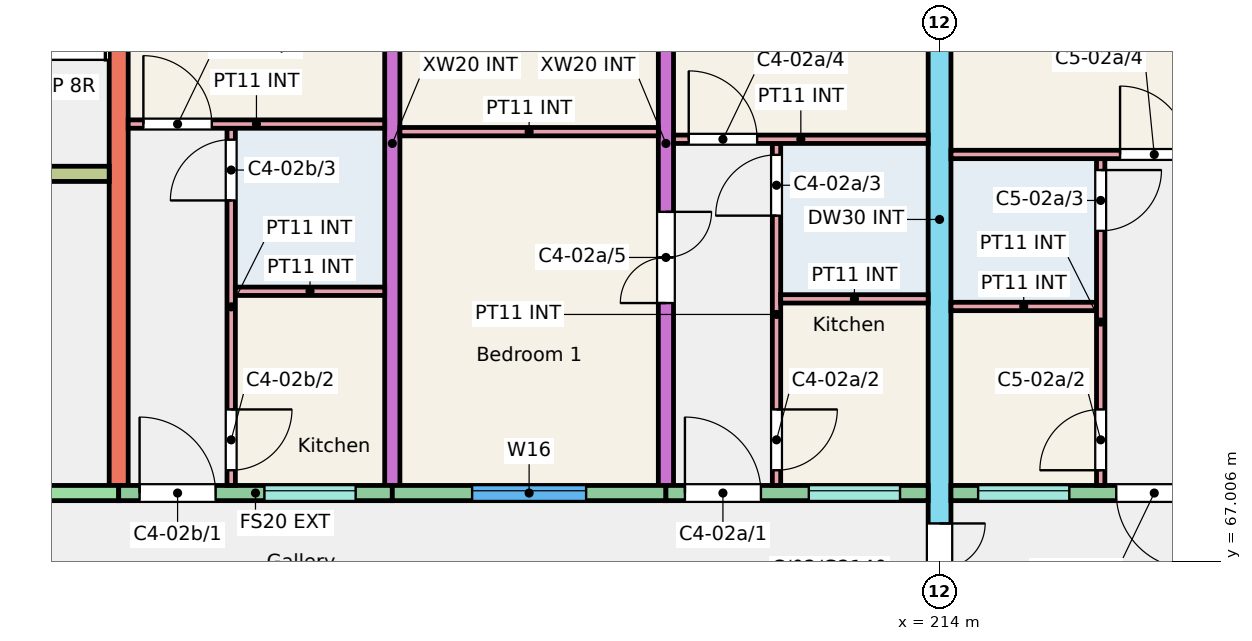
"""IFC4 building model, lengths in metres.
Left out: names, types, materials, properties, quantities, classifications, styles, units other than length and angle.
Written with IfcOpenShell. Run it as: python <this file> out.ifc"""

import sys

from ifc_helpers import new_model, si_unit, direction, frame, frame_2d, origin, place, context, subcontext, project, spatial, rectangle, extrude, element, fill, save


model = new_model("IFC4")
c1 = context("Model", 3, precision=1e-05, world=origin(), true_north=direction((0.0, 1.0)))
c2 = subcontext(c1, "Body", "Model", "MODEL_VIEW")
j1 = project(units=[si_unit("LENGTHUNIT", "METRE"), si_unit("PLANEANGLEUNIT", "RADIAN")], contexts=[c1])
p1 = place(None, origin())
s1 = spatial("IfcSite", under=j1, at=p1, CompositionType="ELEMENT")
p2 = place(p1, origin())
s2 = spatial("IfcBuilding", under=s1, at=p2, CompositionType="ELEMENT")
p3 = place(p2, frame((0.0, 0.0, 6.0)))
s3 = spatial("IfcBuildingStorey", under=s2, at=p3, CompositionType="ELEMENT", Elevation=6.0)
p4 = place(p3, frame((203.2, 68.0, 0.0), z_axis=(0.0, 0.0, 1.0), x_axis=(0.0, 1.0, 0.0)))
e1 = element("IfcWall", 1, at=p4, inside=s3, PredefinedType="SHEAR", context=c2, shape_type="SweptSolid", body=[
    extrude(rectangle(XDim=9.0, YDim=0.25, at=frame_2d((4.5, 0.0))), origin(), (0.0, 0.0, 1.0), 3.0),
])
p5 = place(p3, frame((206.8, 68.0, 0.0), z_axis=(0.0, 0.0, 1.0), x_axis=(0.0, 1.0, 0.0)))
e2 = element("IfcWall", 2, at=p5, inside=s3, PredefinedType="SHEAR", context=c2, shape_type="SweptSolid", body=[
    extrude(rectangle(XDim=9.0, YDim=0.2, at=frame_2d((4.5, 0.0))), origin(), (0.0, 0.0, 1.0), 3.0),
])
p6 = place(p3, frame((210.4, 68.0, 0.0), z_axis=(0.0, 0.0, 1.0), x_axis=(0.0, 1.0, 0.0)))
e3 = element("IfcWall", 3, at=p6, inside=s3, PredefinedType="SHEAR", context=c2, shape_type="SweptSolid", body=[
    extrude(rectangle(XDim=9.0, YDim=0.2, at=frame_2d((4.5, 0.0))), origin(), (0.0, 0.0, 1.0), 3.0),
])
p7 = place(p6, frame((2.4, 0.0, 0.0)))
e4 = element("IfcOpeningElement", 4, at=p7, cuts=e3, PredefinedType="OPENING", context=c2, shape_type="SweptSolid", body=[
    extrude(rectangle(XDim=1.2, YDim=2.1, at=frame_2d((0.6, 1.05))), frame((0.0, 0.11, 0.0), z_axis=(0.0, -1.0, 0.0), x_axis=(1.0, 0.0, 0.0)), (0.0, 0.0, 1.0), 0.22),
])
p8 = place(p6, frame((6.4, 0.0, 0.0)))
e5 = element("IfcOpeningElement", 5, at=p8, cuts=e3, PredefinedType="OPENING", context=c2, shape_type="SweptSolid", body=[
    extrude(rectangle(XDim=1.2, YDim=2.1, at=frame_2d((0.6, 1.05))), frame((0.0, 0.11, 0.0), z_axis=(0.0, -1.0, 0.0), x_axis=(1.0, 0.0, 0.0)), (0.0, 0.0, 1.0), 0.22),
])
p9 = place(p3, frame((214.0, 66.0, 0.0), z_axis=(0.0, 0.0, 1.0), x_axis=(0.0, 1.0, 0.0)))
e6 = element("IfcWall", 6, at=p9, inside=s3, PredefinedType="SHEAR", context=c2, shape_type="SweptSolid", body=[
    extrude(rectangle(XDim=11.0, YDim=0.3, at=frame_2d((5.5, 0.0))), origin(), (0.0, 0.0, 1.0), 3.0),
])
p10 = place(p9, frame((0.3, 0.0, 0.0)))
e7 = element("IfcOpeningElement", 7, at=p10, cuts=e6, PredefinedType="OPENING", context=c2, shape_type="SweptSolid", body=[
    extrude(rectangle(XDim=1.2, YDim=2.1, at=frame_2d((0.6, 1.05))), frame((0.0, 0.16, 0.0), z_axis=(0.0, -1.0, 0.0), x_axis=(1.0, 0.0, 0.0)), (0.0, 0.0, 1.0), 0.32),
])
p11 = place(p3, frame((197.35, 67.9, 0.0), z_axis=(0.0, 0.0, 1.0), x_axis=(1.0, 0.0, 0.0)))
e8 = element("IfcWall", 8, at=p11, inside=s3, PredefinedType="SHEAR", context=c2, shape_type="SweptSolid", body=[
    extrude(rectangle(XDim=5.85, YDim=0.2, at=frame_2d((2.925, 0.0))), origin(), (0.0, 0.0, 1.0), 3.0),
])
p12 = place(p11, frame((2.312, 0.0, 0.0)))
e9 = element("IfcOpeningElement", 9, at=p12, cuts=e8, PredefinedType="OPENING", context=c2, shape_type="SweptSolid", body=[
    extrude(rectangle(XDim=1.1, YDim=2.1, at=frame_2d((0.55, 1.05))), frame((0.0, 0.11, 0.0), z_axis=(0.0, -1.0, 0.0), x_axis=(1.0, 0.0, 0.0)), (0.0, 0.0, 1.0), 0.22),
])
p13 = place(p3, frame((197.35, 72.1, 0.0), z_axis=(0.0, 0.0, 1.0), x_axis=(1.0, 0.0, 0.0)))
e10 = element("IfcWall", 10, at=p13, inside=s3, PredefinedType="SHEAR", context=c2, shape_type="SweptSolid", body=[
    extrude(rectangle(XDim=5.725, YDim=0.2, at=frame_2d((2.862, 0.0))), origin(), (0.0, 0.0, 1.0), 3.0),
])
p14 = place(p13, frame((3.775, 0.0, 0.0)))
e11 = element("IfcOpeningElement", 11, at=p14, cuts=e10, PredefinedType="OPENING", context=c2, shape_type="SweptSolid", body=[
    extrude(rectangle(XDim=1.0, YDim=2.1, at=frame_2d((0.5, 1.05))), frame((0.0, 0.11, 0.0), z_axis=(0.0, -1.0, 0.0), x_axis=(1.0, 0.0, 0.0)), (0.0, 0.0, 1.0), 0.22),
])
p15 = place(p13, frame((0.762, 0.0, 0.0)))
e12 = element("IfcOpeningElement", 12, at=p15, cuts=e10, PredefinedType="OPENING", context=c2, shape_type="SweptSolid", body=[
    extrude(rectangle(XDim=1.1, YDim=2.1, at=frame_2d((0.55, 1.05))), frame((0.0, 0.11, 0.0), z_axis=(0.0, -1.0, 0.0), x_axis=(1.0, 0.0, 0.0)), (0.0, 0.0, 1.0), 0.22),
])
p16 = place(p3, frame((203.2, 67.9, 0.0), z_axis=(0.0, 0.0, 1.0), x_axis=(1.0, 0.0, 0.0)))
e13 = element("IfcWall", 13, at=p16, inside=s3, PredefinedType="SOLIDWALL", context=c2, shape_type="SweptSolid", body=[
    extrude(rectangle(XDim=3.6, YDim=0.2, at=frame_2d((1.8, 0.0))), origin(), (0.0, 0.0, 1.0), 3.0),
])
p17 = place(p16, frame((1.917, 0.0, 1.1)))
e14 = element("IfcOpeningElement", 14, at=p17, cuts=e13, PredefinedType="OPENING", context=c2, shape_type="SweptSolid", body=[
    extrude(rectangle(XDim=1.2, YDim=1.3, at=frame_2d((0.6, 0.65))), frame((0.0, 0.11, 0.0), z_axis=(0.0, -1.0, 0.0), x_axis=(1.0, 0.0, 0.0)), (0.0, 0.0, 1.0), 0.22),
])
p18 = place(p16, frame((0.275, 0.0, 0.0)))
e15 = element("IfcOpeningElement", 15, at=p18, cuts=e13, PredefinedType="OPENING", context=c2, shape_type="SweptSolid", body=[
    extrude(rectangle(XDim=1.0, YDim=2.1, at=frame_2d((0.5, 1.05))), frame((0.0, 0.11, 0.0), z_axis=(0.0, -1.0, 0.0), x_axis=(1.0, 0.0, 0.0)), (0.0, 0.0, 1.0), 0.22),
])
p19 = place(p3, frame((206.8, 67.9, 0.0), z_axis=(0.0, 0.0, 1.0), x_axis=(1.0, 0.0, 0.0)))
e16 = element("IfcWall", 16, at=p19, inside=s3, PredefinedType="SOLIDWALL", context=c2, shape_type="SweptSolid", body=[
    extrude(rectangle(XDim=3.6, YDim=0.2, at=frame_2d((1.8, 0.0))), origin(), (0.0, 0.0, 1.0), 3.0),
])
p20 = place(p19, frame((1.05, 0.0, 0.9)))
e17 = element("IfcOpeningElement", 17, at=p20, cuts=e16, PredefinedType="OPENING", context=c2, shape_type="SweptSolid", body=[
    extrude(rectangle(XDim=1.5, YDim=1.5, at=frame_2d((0.75, 0.75))), frame((0.0, 0.11, 0.0), z_axis=(0.0, -1.0, 0.0), x_axis=(1.0, 0.0, 0.0)), (0.0, 0.0, 1.0), 0.22),
])
p21 = place(p3, frame((210.4, 67.9, 0.0), z_axis=(0.0, 0.0, 1.0), x_axis=(1.0, 0.0, 0.0)))
e18 = element("IfcWall", 18, at=p21, inside=s3, PredefinedType="SOLIDWALL", context=c2, shape_type="SweptSolid", body=[
    extrude(rectangle(XDim=3.45, YDim=0.2, at=frame_2d((1.725, 0.0))), origin(), (0.0, 0.0, 1.0), 3.0),
])
p22 = place(p21, frame((1.88, 0.0, 1.1)))
e19 = element("IfcOpeningElement", 19, at=p22, cuts=e18, PredefinedType="OPENING", context=c2, shape_type="SweptSolid", body=[
    extrude(rectangle(XDim=1.2, YDim=1.3, at=frame_2d((0.6, 0.65))), frame((0.0, 0.11, 0.0), z_axis=(0.0, -1.0, 0.0), x_axis=(1.0, 0.0, 0.0)), (0.0, 0.0, 1.0), 0.22),
])
p23 = place(p21, frame((0.25, 0.0, 0.0)))
e20 = element("IfcOpeningElement", 20, at=p23, cuts=e18, PredefinedType="OPENING", context=c2, shape_type="SweptSolid", body=[
    extrude(rectangle(XDim=1.0, YDim=2.1, at=frame_2d((0.5, 1.05))), frame((0.0, 0.11, 0.0), z_axis=(0.0, -1.0, 0.0), x_axis=(1.0, 0.0, 0.0)), (0.0, 0.0, 1.0), 0.22),
])
p24 = place(p3, frame((214.15, 67.9, 0.0), z_axis=(0.0, 0.0, 1.0), x_axis=(1.0, 0.0, 0.0)))
e21 = element("IfcWall", 21, at=p24, inside=s3, PredefinedType="SOLIDWALL", context=c2, shape_type="SweptSolid", body=[
    extrude(rectangle(XDim=3.45, YDim=0.2, at=frame_2d((1.725, 0.0))), origin(), (0.0, 0.0, 1.0), 3.0),
])
p25 = place(p24, frame((0.357, 0.0, 1.1)))
e22 = element("IfcOpeningElement", 22, at=p25, cuts=e21, PredefinedType="OPENING", context=c2, shape_type="SweptSolid", body=[
    extrude(rectangle(XDim=1.2, YDim=1.3, at=frame_2d((0.6, 0.65))), frame((0.0, 0.11, 0.0), z_axis=(0.0, -1.0, 0.0), x_axis=(1.0, 0.0, 0.0)), (0.0, 0.0, 1.0), 0.22),
])
p26 = place(p24, frame((2.175, 0.0, 0.0)))
e23 = element("IfcOpeningElement", 23, at=p26, cuts=e21, PredefinedType="OPENING", context=c2, shape_type="SweptSolid", body=[
    extrude(rectangle(XDim=1.0, YDim=2.1, at=frame_2d((0.5, 1.05))), frame((0.0, 0.11, 0.0), z_axis=(0.0, -1.0, 0.0), x_axis=(1.0, 0.0, 0.0)), (0.0, 0.0, 1.0), 0.22),
])
p27 = place(p3, frame((211.855, 68.0, 0.0), z_axis=(0.0, 0.0, 1.0), x_axis=(0.0, 1.0, 0.0)))
e24 = element("IfcWall", 24, at=p27, inside=s3, PredefinedType="PARTITIONING", context=c2, shape_type="SweptSolid", body=[
    extrude(rectangle(XDim=4.5, YDim=0.11, at=frame_2d((2.25, 0.0))), origin(), (0.0, 0.0, 1.0), 2.8),
])
p28 = place(p27, frame((0.2, 0.0, 0.0)))
e25 = element("IfcOpeningElement", 25, at=p28, cuts=e24, PredefinedType="OPENING", context=c2, shape_type="SweptSolid", body=[
    extrude(rectangle(XDim=0.8, YDim=2.1, at=frame_2d((0.4, 1.05))), frame((0.0, 0.065, 0.0), z_axis=(0.0, -1.0, 0.0), x_axis=(1.0, 0.0, 0.0)), (0.0, 0.0, 1.0), 0.13),
])
p29 = place(p27, frame((3.55, 0.0, 0.0)))
e26 = element("IfcOpeningElement", 26, at=p29, cuts=e24, PredefinedType="OPENING", context=c2, shape_type="SweptSolid", body=[
    extrude(rectangle(XDim=0.8, YDim=2.1, at=frame_2d((0.4, 1.05))), frame((0.0, 0.065, 0.0), z_axis=(0.0, -1.0, 0.0), x_axis=(1.0, 0.0, 0.0)), (0.0, 0.0, 1.0), 0.13),
])
p30 = place(p3, frame((211.91, 70.455, 0.0), z_axis=(0.0, 0.0, 1.0), x_axis=(1.0, 0.0, 0.0)))
e27 = element("IfcWall", 27, at=p30, inside=s3, PredefinedType="PARTITIONING", context=c2, shape_type="SweptSolid", body=[
    extrude(rectangle(XDim=1.94, YDim=0.11, at=frame_2d((0.97, 0.0))), origin(), (0.0, 0.0, 1.0), 2.8),
])
p31 = place(p3, frame((210.5, 72.555, 0.0), z_axis=(0.0, 0.0, 1.0), x_axis=(1.0, 0.0, 0.0)))
e28 = element("IfcWall", 28, at=p31, inside=s3, PredefinedType="PARTITIONING", context=c2, shape_type="SweptSolid", body=[
    extrude(rectangle(XDim=3.35, YDim=0.11, at=frame_2d((1.675, 0.0))), origin(), (0.0, 0.0, 1.0), 2.8),
])
p32 = place(p31, frame((0.2, 0.0, 0.0)))
e29 = element("IfcOpeningElement", 29, at=p32, cuts=e28, PredefinedType="OPENING", context=c2, shape_type="SweptSolid", body=[
    extrude(rectangle(XDim=0.9, YDim=2.1, at=frame_2d((0.45, 1.05))), frame((0.0, 0.065, 0.0), z_axis=(0.0, -1.0, 0.0), x_axis=(1.0, 0.0, 0.0)), (0.0, 0.0, 1.0), 0.13),
])
p33 = place(p3, frame((206.9, 72.655, 0.0), z_axis=(0.0, 0.0, 1.0), x_axis=(1.0, 0.0, 0.0)))
e30 = element("IfcWall", 30, at=p33, inside=s3, PredefinedType="PARTITIONING", context=c2, shape_type="SweptSolid", body=[
    extrude(rectangle(XDim=3.4, YDim=0.11, at=frame_2d((1.7, 0.0))), origin(), (0.0, 0.0, 1.0), 2.8),
])
p34 = place(p3, frame((204.68, 68.0, 0.0), z_axis=(0.0, 0.0, 1.0), x_axis=(0.0, 1.0, 0.0)))
e31 = element("IfcWall", 31, at=p34, inside=s3, PredefinedType="PARTITIONING", context=c2, shape_type="SweptSolid", body=[
    extrude(rectangle(XDim=4.7, YDim=0.11, at=frame_2d((2.35, 0.0))), origin(), (0.0, 0.0, 1.0), 2.8),
])
p35 = place(p34, frame((0.2, 0.0, 0.0)))
e32 = element("IfcOpeningElement", 32, at=p35, cuts=e31, PredefinedType="OPENING", context=c2, shape_type="SweptSolid", body=[
    extrude(rectangle(XDim=0.8, YDim=2.1, at=frame_2d((0.4, 1.05))), frame((0.0, 0.065, 0.0), z_axis=(0.0, -1.0, 0.0), x_axis=(1.0, 0.0, 0.0)), (0.0, 0.0, 1.0), 0.13),
])
p36 = place(p34, frame((3.75, 0.0, 0.0)))
e33 = element("IfcOpeningElement", 33, at=p36, cuts=e31, PredefinedType="OPENING", context=c2, shape_type="SweptSolid", body=[
    extrude(rectangle(XDim=0.8, YDim=2.1, at=frame_2d((0.4, 1.05))), frame((0.0, 0.065, 0.0), z_axis=(0.0, -1.0, 0.0), x_axis=(1.0, 0.0, 0.0)), (0.0, 0.0, 1.0), 0.13),
])
p37 = place(p3, frame((204.735, 70.555, 0.0), z_axis=(0.0, 0.0, 1.0), x_axis=(1.0, 0.0, 0.0)))
e34 = element("IfcWall", 34, at=p37, inside=s3, PredefinedType="PARTITIONING", context=c2, shape_type="SweptSolid", body=[
    extrude(rectangle(XDim=1.965, YDim=0.11, at=frame_2d((0.982, 0.0))), origin(), (0.0, 0.0, 1.0), 2.8),
])
p38 = place(p3, frame((203.325, 72.755, 0.0), z_axis=(0.0, 0.0, 1.0), x_axis=(1.0, 0.0, 0.0)))
e35 = element("IfcWall", 35, at=p38, inside=s3, PredefinedType="PARTITIONING", context=c2, shape_type="SweptSolid", body=[
    extrude(rectangle(XDim=3.375, YDim=0.11, at=frame_2d((1.688, 0.0))), origin(), (0.0, 0.0, 1.0), 2.8),
])
p39 = place(p38, frame((0.2, 0.0, 0.0)))
e36 = element("IfcOpeningElement", 36, at=p39, cuts=e35, PredefinedType="OPENING", context=c2, shape_type="SweptSolid", body=[
    extrude(rectangle(XDim=0.9, YDim=2.1, at=frame_2d((0.45, 1.05))), frame((0.0, 0.065, 0.0), z_axis=(0.0, -1.0, 0.0), x_axis=(1.0, 0.0, 0.0)), (0.0, 0.0, 1.0), 0.13),
])
p40 = place(p3, frame((214.15, 70.355, 0.0), z_axis=(0.0, 0.0, 1.0), x_axis=(1.0, 0.0, 0.0)))
e37 = element("IfcWall", 37, at=p40, inside=s3, PredefinedType="PARTITIONING", context=c2, shape_type="SweptSolid", body=[
    extrude(rectangle(XDim=1.915, YDim=0.11, at=frame_2d((0.958, 0.0))), origin(), (0.0, 0.0, 1.0), 2.8),
])
p41 = place(p3, frame((216.12, 68.0, 0.0), z_axis=(0.0, 0.0, 1.0), x_axis=(0.0, 1.0, 0.0)))
e38 = element("IfcWall", 38, at=p41, inside=s3, PredefinedType="PARTITIONING", context=c2, shape_type="SweptSolid", body=[
    extrude(rectangle(XDim=4.3, YDim=0.11, at=frame_2d((2.15, 0.0))), origin(), (0.0, 0.0, 1.0), 2.8),
])
p42 = place(p41, frame((0.2, 0.0, 0.0)))
e39 = element("IfcOpeningElement", 39, at=p42, cuts=e38, PredefinedType="OPENING", context=c2, shape_type="SweptSolid", body=[
    extrude(rectangle(XDim=0.8, YDim=2.1, at=frame_2d((0.4, 1.05))), frame((0.0, 0.065, 0.0), z_axis=(0.0, -1.0, 0.0), x_axis=(1.0, 0.0, 0.0)), (0.0, 0.0, 1.0), 0.13),
])
p43 = place(p41, frame((3.35, 0.0, 0.0)))
e40 = element("IfcOpeningElement", 40, at=p43, cuts=e38, PredefinedType="OPENING", context=c2, shape_type="SweptSolid", body=[
    extrude(rectangle(XDim=0.8, YDim=2.1, at=frame_2d((0.4, 1.05))), frame((0.0, 0.065, 0.0), z_axis=(0.0, -1.0, 0.0), x_axis=(1.0, 0.0, 0.0)), (0.0, 0.0, 1.0), 0.13),
])
p44 = place(p3, frame((214.15, 72.355, 0.0), z_axis=(0.0, 0.0, 1.0), x_axis=(1.0, 0.0, 0.0)))
e41 = element("IfcWall", 41, at=p44, inside=s3, PredefinedType="PARTITIONING", context=c2, shape_type="SweptSolid", body=[
    extrude(rectangle(XDim=3.325, YDim=0.11, at=frame_2d((1.663, 0.0))), origin(), (0.0, 0.0, 1.0), 2.8),
])
p45 = place(p44, frame((2.225, 0.0, 0.0)))
e42 = element("IfcOpeningElement", 42, at=p45, cuts=e41, PredefinedType="OPENING", context=c2, shape_type="SweptSolid", body=[
    extrude(rectangle(XDim=0.9, YDim=2.1, at=frame_2d((0.45, 1.05))), frame((0.0, 0.065, 0.0), z_axis=(0.0, -1.0, 0.0), x_axis=(1.0, 0.0, 0.0)), (0.0, 0.0, 1.0), 0.13),
])
p46 = place(p20, origin())
e43 = element("IfcWindow", 43, at=p46, inside=s3, PartitioningType="SINGLE_PANEL", PredefinedType="WINDOW", context=c2, shape_type="SweptSolid", body=[
    extrude(rectangle(XDim=1.5, YDim=1.5, at=frame_2d((0.75, 0.75))), frame((0.0, 0.06, 0.0), z_axis=(0.0, -1.0, 0.0), x_axis=(1.0, 0.0, 0.0)), (0.0, 0.0, 1.0), 0.06),
])
fill(e17, e43)
p47 = place(p22, origin())
e44 = element("IfcWindow", 44, at=p47, inside=s3, PartitioningType="SINGLE_PANEL", PredefinedType="WINDOW", context=c2, shape_type="SweptSolid", body=[
    extrude(rectangle(XDim=1.2, YDim=1.3, at=frame_2d((0.6, 0.65))), frame((0.0, 0.06, 0.0), z_axis=(0.0, -1.0, 0.0), x_axis=(1.0, 0.0, 0.0)), (0.0, 0.0, 1.0), 0.06),
])
fill(e19, e44)
p48 = place(p17, origin())
e45 = element("IfcWindow", 45, at=p48, inside=s3, PartitioningType="SINGLE_PANEL", PredefinedType="WINDOW", context=c2, shape_type="SweptSolid", body=[
    extrude(rectangle(XDim=1.2, YDim=1.3, at=frame_2d((0.6, 0.65))), frame((0.0, 0.06, 0.0), z_axis=(0.0, -1.0, 0.0), x_axis=(1.0, 0.0, 0.0)), (0.0, 0.0, 1.0), 0.06),
])
fill(e14, e45)
p49 = place(p25, origin())
e46 = element("IfcWindow", 46, at=p49, inside=s3, PartitioningType="SINGLE_PANEL", PredefinedType="WINDOW", context=c2, shape_type="SweptSolid", body=[
    extrude(rectangle(XDim=1.2, YDim=1.3, at=frame_2d((0.6, 0.65))), frame((0.0, 0.06, 0.0), z_axis=(0.0, -1.0, 0.0), x_axis=(1.0, 0.0, 0.0)), (0.0, 0.0, 1.0), 0.06),
])
fill(e22, e46)
p50 = place(p23, origin())
e47 = element("IfcDoor", 47, at=p50, inside=s3, OperationType="SINGLE_SWING_LEFT", PredefinedType="DOOR", context=c2, shape_type="SweptSolid", body=[
    extrude(rectangle(XDim=1.0, YDim=2.1, at=frame_2d((0.5, 1.05))), frame((0.0, 0.025, 0.0), z_axis=(0.0, -1.0, 0.0), x_axis=(1.0, 0.0, 0.0)), (0.0, 0.0, 1.0), 0.05),
])
fill(e20, e47)
p51 = place(p28, origin())
e48 = element("IfcDoor", 48, at=p51, inside=s3, OperationType="SINGLE_SWING_RIGHT", PredefinedType="DOOR", context=c2, shape_type="SweptSolid", body=[
    extrude(rectangle(XDim=0.8, YDim=2.1, at=frame_2d((0.4, 1.05))), frame((0.0, 0.025, 0.0), z_axis=(0.0, -1.0, 0.0), x_axis=(1.0, 0.0, 0.0)), (0.0, 0.0, 1.0), 0.05),
])
fill(e25, e48)
p52 = place(p29, origin())
e49 = element("IfcDoor", 49, at=p52, inside=s3, OperationType="SINGLE_SWING_LEFT", PredefinedType="DOOR", context=c2, shape_type="SweptSolid", body=[
    extrude(rectangle(XDim=0.8, YDim=2.1, at=frame_2d((0.4, 1.05))), frame((0.0, 0.025, 0.0), z_axis=(0.0, -1.0, 0.0), x_axis=(1.0, 0.0, 0.0)), (0.0, 0.0, 1.0), 0.05),
])
fill(e26, e49)
p53 = place(p32, origin())
e50 = element("IfcDoor", 50, at=p53, inside=s3, OperationType="SINGLE_SWING_LEFT", PredefinedType="DOOR", context=c2, shape_type="SweptSolid", body=[
    extrude(rectangle(XDim=0.9, YDim=2.1, at=frame_2d((0.45, 1.05))), frame((0.0, 0.025, 0.0), z_axis=(0.0, -1.0, 0.0), x_axis=(1.0, 0.0, 0.0)), (0.0, 0.0, 1.0), 0.05),
])
fill(e29, e50)
p54 = place(p7, origin())
e51 = element("IfcDoor", 51, at=p54, inside=s3, OperationType="DOUBLE_DOOR_SINGLE_SWING", PredefinedType="DOOR", context=c2, shape_type="SweptSolid", body=[
    extrude(rectangle(XDim=1.2, YDim=2.1, at=frame_2d((0.6, 1.05))), frame((0.0, 0.025, 0.0), z_axis=(0.0, -1.0, 0.0), x_axis=(1.0, 0.0, 0.0)), (0.0, 0.0, 1.0), 0.05),
])
fill(e4, e51)
p55 = place(p18, origin())
e52 = element("IfcDoor", 52, at=p55, inside=s3, OperationType="SINGLE_SWING_LEFT", PredefinedType="DOOR", context=c2, shape_type="SweptSolid", body=[
    extrude(rectangle(XDim=1.0, YDim=2.1, at=frame_2d((0.5, 1.05))), frame((0.0, 0.025, 0.0), z_axis=(0.0, -1.0, 0.0), x_axis=(1.0, 0.0, 0.0)), (0.0, 0.0, 1.0), 0.05),
])
fill(e15, e52)
p56 = place(p35, origin())
e53 = element("IfcDoor", 53, at=p56, inside=s3, OperationType="SINGLE_SWING_RIGHT", PredefinedType="DOOR", context=c2, shape_type="SweptSolid", body=[
    extrude(rectangle(XDim=0.8, YDim=2.1, at=frame_2d((0.4, 1.05))), frame((0.0, 0.025, 0.0), z_axis=(0.0, -1.0, 0.0), x_axis=(1.0, 0.0, 0.0)), (0.0, 0.0, 1.0), 0.05),
])
fill(e32, e53)
p57 = place(p36, origin())
e54 = element("IfcDoor", 54, at=p57, inside=s3, OperationType="SINGLE_SWING_LEFT", PredefinedType="DOOR", context=c2, shape_type="SweptSolid", body=[
    extrude(rectangle(XDim=0.8, YDim=2.1, at=frame_2d((0.4, 1.05))), frame((0.0, 0.025, 0.0), z_axis=(0.0, -1.0, 0.0), x_axis=(1.0, 0.0, 0.0)), (0.0, 0.0, 1.0), 0.05),
])
fill(e33, e54)
p58 = place(p39, origin())
e55 = element("IfcDoor", 55, at=p58, inside=s3, OperationType="SINGLE_SWING_LEFT", PredefinedType="DOOR", context=c2, shape_type="SweptSolid", body=[
    extrude(rectangle(XDim=0.9, YDim=2.1, at=frame_2d((0.45, 1.05))), frame((0.0, 0.025, 0.0), z_axis=(0.0, -1.0, 0.0), x_axis=(1.0, 0.0, 0.0)), (0.0, 0.0, 1.0), 0.05),
])
fill(e36, e55)
p59 = place(p26, origin())
e56 = element("IfcDoor", 56, at=p59, inside=s3, OperationType="SINGLE_SWING_RIGHT", PredefinedType="DOOR", context=c2, shape_type="SweptSolid", body=[
    extrude(rectangle(XDim=1.0, YDim=2.1, at=frame_2d((0.5, 1.05))), frame((0.0, 0.025, 0.0), z_axis=(0.0, -1.0, 0.0), x_axis=(1.0, 0.0, 0.0)), (0.0, 0.0, 1.0), 0.05),
])
fill(e23, e56)
p60 = place(p42, origin())
e57 = element("IfcDoor", 57, at=p60, inside=s3, OperationType="SINGLE_SWING_LEFT", PredefinedType="DOOR", context=c2, shape_type="SweptSolid", body=[
    extrude(rectangle(XDim=0.8, YDim=2.1, at=frame_2d((0.4, 1.05))), frame((0.0, 0.025, 0.0), z_axis=(0.0, -1.0, 0.0), x_axis=(1.0, 0.0, 0.0)), (0.0, 0.0, 1.0), 0.05),
])
fill(e39, e57)
p61 = place(p43, origin())
e58 = element("IfcDoor", 58, at=p61, inside=s3, OperationType="SINGLE_SWING_RIGHT", PredefinedType="DOOR", context=c2, shape_type="SweptSolid", body=[
    extrude(rectangle(XDim=0.8, YDim=2.1, at=frame_2d((0.4, 1.05))), frame((0.0, 0.025, 0.0), z_axis=(0.0, -1.0, 0.0), x_axis=(1.0, 0.0, 0.0)), (0.0, 0.0, 1.0), 0.05),
])
fill(e40, e58)
p62 = place(p45, origin())
e59 = element("IfcDoor", 59, at=p62, inside=s3, OperationType="SINGLE_SWING_LEFT", PredefinedType="DOOR", context=c2, shape_type="SweptSolid", body=[
    extrude(rectangle(XDim=0.9, YDim=2.1, at=frame_2d((0.45, 1.05))), frame((0.0, 0.025, 0.0), z_axis=(0.0, -1.0, 0.0), x_axis=(1.0, 0.0, 0.0)), (0.0, 0.0, 1.0), 0.05),
])
fill(e42, e59)
p63 = place(p10, origin())
e60 = element("IfcDoor", 60, at=p63, inside=s3, OperationType="DOUBLE_DOOR_SINGLE_SWING", PredefinedType="DOOR", context=c2, shape_type="SweptSolid", body=[
    extrude(rectangle(XDim=1.2, YDim=2.1, at=frame_2d((0.6, 1.05))), frame((0.0, 0.025, 0.0), z_axis=(0.0, -1.0, 0.0), x_axis=(1.0, 0.0, 0.0)), (0.0, 0.0, 1.0), 0.05),
])
fill(e7, e60)
save(model, sys.argv[1])
